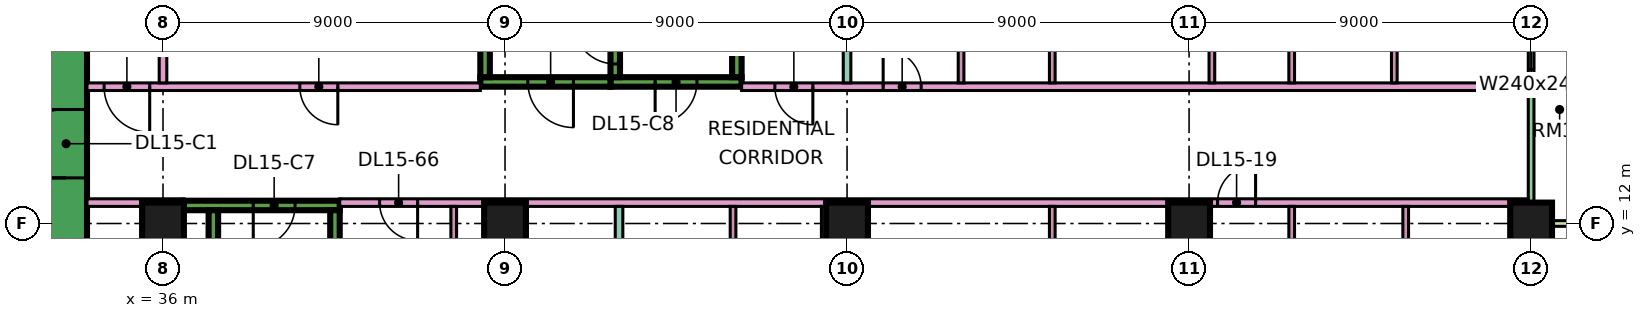
"""IFC4 building model, lengths in metres.
Left out: names, types, materials, properties, quantities, classifications, styles, units other than length and angle.
Written with IfcOpenShell. Run it as: python <this file> out.ifc"""

import sys

from ifc_helpers import new_model, si_unit, direction, frame, frame_2d, origin, origin_2d, place, context, subcontext, project, spatial, rectangle, extrude, element, fill, save


model = new_model("IFC4")
c1 = context("Model", 3, precision=1e-05, world=origin(), true_north=direction((0.0, 1.0)))
c2 = subcontext(c1, "Body", "Model", "MODEL_VIEW")
j1 = project(units=[si_unit("LENGTHUNIT", "METRE"), si_unit("PLANEANGLEUNIT", "RADIAN")], contexts=[c1])
p1 = place(None, origin())
s1 = spatial("IfcSite", under=j1, at=p1, CompositionType="ELEMENT")
p2 = place(p1, origin())
s2 = spatial("IfcBuilding", under=s1, at=p2, CompositionType="ELEMENT")
p3 = place(p2, frame((0.0, 0.0, 71.4)))
s3 = spatial("IfcBuildingStorey", under=s2, at=p3, CompositionType="ELEMENT", Elevation=71.4)
for number, where, z_axis, x_axis in (
    (1, (36.0, 12.0, 0.0), (0.0, 0.0, 1.0), (1.0, 0.0, 0.0)),
    (2, (45.0, 12.0, 0.0), (0.0, 0.0, 1.0), (1.0, 0.0, 0.0)),
    (3, (54.0, 12.0, 0.0), (0.0, 0.0, 1.0), (1.0, 0.0, 0.0)),
    (4, (63.0, 12.0, 0.0), (0.0, 0.0, 1.0), (1.0, 0.0, 0.0)),
    (5, (72.0, 12.0, 0.0), (0.0, 0.0, 1.0), (1.0, 0.0, 0.0)),
):
    element("IfcColumn", number, at=place(p3, frame(where, z_axis=z_axis, x_axis=x_axis)), inside=s3, PredefinedType="COLUMN", context=c2, shape_type="SweptSolid", body=[
        extrude(rectangle(XDim=1.1, YDim=1.1, at=origin_2d()), origin(), (0.0, 0.0, 1.0), 3.75),
    ])
p4 = place(p3, frame((33.45, 8.1, 0.0), z_axis=(0.0, 0.0, 1.0), x_axis=(0.0, 1.0, 0.0)))
e6 = element("IfcWall", 6, at=p4, inside=s3, PredefinedType="SHEAR", context=c2, shape_type="SweptSolid", body=[
    extrude(rectangle(XDim=10.8, YDim=1.1, at=frame_2d((5.4, 0.0))), origin(), (0.0, 0.0, 1.0), 3.75),
])
p5 = place(p4, frame((5.1, 0.0, 0.0)))
e7 = element("IfcOpeningElement", 7, at=p5, cuts=e6, PredefinedType="OPENING", context=c2, shape_type="SweptSolid", body=[
    extrude(rectangle(XDim=1.8, YDim=2.4, at=frame_2d((0.9, 1.2))), frame((0.0, 0.56, 0.0), z_axis=(0.0, -1.0, 0.0), x_axis=(1.0, 0.0, 0.0)), (0.0, 0.0, 1.0), 1.12),
])
p6 = place(p3, frame((36.55, 12.475, 0.0), z_axis=(0.0, 0.0, 1.0), x_axis=(1.0, 0.0, 0.0)))
e8 = element("IfcWall", 8, at=p6, inside=s3, PredefinedType="SHEAR", context=c2, shape_type="SweptSolid", body=[
    extrude(rectangle(XDim=4.1, YDim=0.25, at=frame_2d((2.05, 0.0))), origin(), (0.0, 0.0, 1.0), 3.75),
])
p7 = place(p6, frame((1.825, 0.0, 0.0)))
e9 = element("IfcOpeningElement", 9, at=p7, cuts=e8, PredefinedType="OPENING", context=c2, shape_type="SweptSolid", body=[
    extrude(rectangle(XDim=1.1, YDim=2.2, at=frame_2d((0.55, 1.1))), frame((0.0, 0.135, 0.0), z_axis=(0.0, -1.0, 0.0), x_axis=(1.0, 0.0, 0.0)), (0.0, 0.0, 1.0), 0.27),
])
for number, where, z_axis, x_axis in (
    (10, (37.325, 5.85, 0.0), (0.0, 0.0, 1.0), (0.0, 1.0, 0.0)),
    (11, (40.525, 5.85, 0.0), (0.0, 0.0, 1.0), (0.0, 1.0, 0.0)),
):
    element("IfcWall", number, at=place(p3, frame(where, z_axis=z_axis, x_axis=x_axis)), inside=s3, PredefinedType="SHEAR", context=c2, shape_type="SweptSolid", body=[
        extrude(rectangle(XDim=6.5, YDim=0.25, at=frame_2d((3.25, 0.0))), origin(), (0.0, 0.0, 1.0), 3.75),
    ])
p8 = place(p3, frame((47.775, 15.725, 0.0), z_axis=(0.0, 0.0, 1.0), x_axis=(1.0, 0.0, 0.0)))
e12 = element("IfcWall", 12, at=p8, inside=s3, PredefinedType="SHEAR", context=c2, shape_type="SweptSolid", body=[
    extrude(rectangle(XDim=3.45, YDim=0.25, at=frame_2d((1.725, 0.0))), origin(), (0.0, 0.0, 1.0), 3.75),
])
p9 = place(p8, frame((1.175, 0.0, 0.0)))
e13 = element("IfcOpeningElement", 13, at=p9, cuts=e12, PredefinedType="OPENING", context=c2, shape_type="SweptSolid", body=[
    extrude(rectangle(XDim=1.1, YDim=2.2, at=frame_2d((0.55, 1.1))), frame((0.0, 0.135, 0.0), z_axis=(0.0, -1.0, 0.0), x_axis=(1.0, 0.0, 0.0)), (0.0, 0.0, 1.0), 0.27),
])
p10 = place(p3, frame((47.9, 15.85, 0.0), z_axis=(0.0, 0.0, 1.0), x_axis=(0.0, 1.0, 0.0)))
e14 = element("IfcWall", 14, at=p10, inside=s3, PredefinedType="SHEAR", context=c2, shape_type="SweptSolid", body=[
    extrude(rectangle(XDim=6.5, YDim=0.25, at=frame_2d((3.25, 0.0))), origin(), (0.0, 0.0, 1.0), 3.75),
])
p11 = place(p10, frame((0.35, 0.0, 0.0)))
e15 = element("IfcOpeningElement", 15, at=p11, cuts=e14, PredefinedType="OPENING", context=c2, shape_type="SweptSolid", body=[
    extrude(rectangle(XDim=1.1, YDim=2.2, at=frame_2d((0.55, 1.1))), frame((0.0, 0.135, 0.0), z_axis=(0.0, -1.0, 0.0), x_axis=(1.0, 0.0, 0.0)), (0.0, 0.0, 1.0), 0.27),
])
p12 = place(p3, frame((51.1, 15.85, 0.0), z_axis=(0.0, 0.0, 1.0), x_axis=(0.0, 1.0, 0.0)))
e16 = element("IfcWall", 16, at=p12, inside=s3, PredefinedType="SHEAR", context=c2, shape_type="SweptSolid", body=[
    extrude(rectangle(XDim=6.5, YDim=0.25, at=frame_2d((3.25, 0.0))), origin(), (0.0, 0.0, 1.0), 3.75),
])
p13 = place(p3, frame((44.35, 15.725, 0.0), z_axis=(0.0, 0.0, 1.0), x_axis=(1.0, 0.0, 0.0)))
e17 = element("IfcWall", 17, at=p13, inside=s3, PredefinedType="SHEAR", context=c2, shape_type="SweptSolid", body=[
    extrude(rectangle(XDim=3.425, YDim=0.25, at=frame_2d((1.712, 0.0))), origin(), (0.0, 0.0, 1.0), 3.75),
])
p14 = place(p13, frame((1.25, 0.0, 0.0)))
e18 = element("IfcOpeningElement", 18, at=p14, cuts=e17, PredefinedType="OPENING", context=c2, shape_type="SweptSolid", body=[
    extrude(rectangle(XDim=1.2, YDim=2.2, at=frame_2d((0.6, 1.1))), frame((0.0, 0.135, 0.0), z_axis=(0.0, -1.0, 0.0), x_axis=(1.0, 0.0, 0.0)), (0.0, 0.0, 1.0), 0.27),
])
p15 = place(p3, frame((44.475, 15.85, 0.0), z_axis=(0.0, 0.0, 1.0), x_axis=(0.0, 1.0, 0.0)))
e19 = element("IfcWall", 19, at=p15, inside=s3, PredefinedType="SHEAR", context=c2, shape_type="SweptSolid", body=[
    extrude(rectangle(XDim=6.5, YDim=0.25, at=frame_2d((3.25, 0.0))), origin(), (0.0, 0.0, 1.0), 3.75),
])
p16 = place(p15, frame((1.75, 0.0, 0.0)))
e20 = element("IfcOpeningElement", 20, at=p16, cuts=e19, PredefinedType="OPENING", context=c2, shape_type="SweptSolid", body=[
    extrude(rectangle(XDim=1.1, YDim=2.2, at=frame_2d((0.55, 1.1))), frame((0.0, 0.135, 0.0), z_axis=(0.0, -1.0, 0.0), x_axis=(1.0, 0.0, 0.0)), (0.0, 0.0, 1.0), 0.27),
])
p17 = place(p15, frame((4.3, 0.0, 0.0)))
e21 = element("IfcOpeningElement", 21, at=p17, cuts=e19, PredefinedType="OPENING", context=c2, shape_type="SweptSolid", body=[
    extrude(rectangle(XDim=1.1, YDim=2.2, at=frame_2d((0.55, 1.1))), frame((0.0, 0.135, 0.0), z_axis=(0.0, -1.0, 0.0), x_axis=(1.0, 0.0, 0.0)), (0.0, 0.0, 1.0), 0.27),
])
p18 = place(p3, frame((72.0, 12.075, 0.0), z_axis=(0.0, 0.0, 1.0), x_axis=(0.0, 1.0, 0.0)))
e22 = element("IfcWall", 22, at=p18, inside=s3, PredefinedType="SOLIDWALL", context=c2, shape_type="SweptSolid", body=[
    extrude(rectangle(XDim=10.35, YDim=0.15, at=frame_2d((5.175, 0.0))), origin(), (0.0, 0.0, 1.0), 3.35),
])
p19 = place(p18, frame((3.975, 0.0, 0.45)))
e23 = element("IfcOpeningElement", 23, at=p19, cuts=e22, PredefinedType="OPENING", context=c2, shape_type="SweptSolid", body=[
    extrude(rectangle(XDim=2.4, YDim=2.4, at=frame_2d((1.2, 1.2))), frame((0.0, 0.085, 0.0), z_axis=(0.0, -1.0, 0.0), x_axis=(1.0, 0.0, 0.0)), (0.0, 0.0, 1.0), 0.17),
])
p20 = place(p18, frame((8.587, 0.0, 0.45)))
e24 = element("IfcOpeningElement", 24, at=p20, cuts=e22, PredefinedType="OPENING", context=c2, shape_type="SweptSolid", body=[
    extrude(rectangle(XDim=1.2, YDim=2.4, at=frame_2d((0.6, 1.2))), frame((0.0, 0.085, 0.0), z_axis=(0.0, -1.0, 0.0), x_axis=(1.0, 0.0, 0.0)), (0.0, 0.0, 1.0), 0.17),
])
p21 = place(p3, frame((73.5, 12.0, 0.0), z_axis=(0.0, 0.0, 1.0), x_axis=(-1.0, 0.0, 0.0)))
e25 = element("IfcWall", 25, at=p21, inside=s3, PredefinedType="SOLIDWALL", context=c2, shape_type="SweptSolid", body=[
    extrude(rectangle(XDim=1.5, YDim=0.15, at=frame_2d((0.75, 0.0))), origin(), (0.0, 0.0, 1.0), 3.35),
])
p22 = place(p3, frame((34.0, 12.55, 0.0), z_axis=(0.0, 0.0, 1.0), x_axis=(1.0, 0.0, 0.0)))
e26 = element("IfcWall", 26, at=p22, inside=s3, PredefinedType="PARTITIONING", context=c2, shape_type="SweptSolid", body=[
    extrude(rectangle(XDim=2.551, YDim=0.2, at=frame_2d((1.275, 0.0))), origin(), (0.0, 0.0, 1.0), 3.35),
])
p23 = place(p3, frame((34.0, 15.6, 0.0), z_axis=(0.0, 0.0, 1.0), x_axis=(1.0, 0.0, 0.0)))
e27 = element("IfcWall", 27, at=p23, inside=s3, PredefinedType="PARTITIONING", context=c2, shape_type="SweptSolid", body=[
    extrude(rectangle(XDim=10.35, YDim=0.2, at=frame_2d((5.175, 0.0))), origin(), (0.0, 0.0, 1.0), 3.35),
])
p24 = place(p23, frame((5.6, 0.0, 0.0)))
e28 = element("IfcOpeningElement", 28, at=p24, cuts=e27, PredefinedType="OPENING", context=c2, shape_type="SweptSolid", body=[
    extrude(rectangle(XDim=1.0, YDim=2.1, at=frame_2d((0.5, 1.05))), frame((0.0, 0.11, 0.0), z_axis=(0.0, -1.0, 0.0), x_axis=(1.0, 0.0, 0.0)), (0.0, 0.0, 1.0), 0.22),
])
p25 = place(p23, frame((0.45, 0.0, 0.0)))
e29 = element("IfcOpeningElement", 29, at=p25, cuts=e27, PredefinedType="OPENING", context=c2, shape_type="SweptSolid", body=[
    extrude(rectangle(XDim=1.2, YDim=2.1, at=frame_2d((0.6, 1.05))), frame((0.0, 0.11, 0.0), z_axis=(0.0, -1.0, 0.0), x_axis=(1.0, 0.0, 0.0)), (0.0, 0.0, 1.0), 0.22),
])
p26 = place(p3, frame((36.0, 15.7, 0.0), z_axis=(0.0, 0.0, 1.0), x_axis=(0.0, 1.0, 0.0)))
e30 = element("IfcWall", 30, at=p26, inside=s3, PredefinedType="PARTITIONING", context=c2, shape_type="SweptSolid", body=[
    extrude(rectangle(XDim=8.3, YDim=0.2, at=frame_2d((4.15, 0.0))), origin(), (0.0, 0.0, 1.0), 3.35),
])
p27 = place(p3, frame((40.65, 12.55, 0.0), z_axis=(0.0, 0.0, 1.0), x_axis=(1.0, 0.0, 0.0)))
e31 = element("IfcWall", 31, at=p27, inside=s3, PredefinedType="PARTITIONING", context=c2, shape_type="SweptSolid", body=[
    extrude(rectangle(XDim=31.276, YDim=0.2, at=frame_2d((15.638, 0.0))), origin(), (0.0, 0.0, 1.0), 3.35),
])
p28 = place(p27, frame((23.1, 0.0, 0.0)))
e32 = element("IfcOpeningElement", 32, at=p28, cuts=e31, PredefinedType="OPENING", context=c2, shape_type="SweptSolid", body=[
    extrude(rectangle(XDim=1.0, YDim=2.1, at=frame_2d((0.5, 1.05))), frame((0.0, 0.11, 0.0), z_axis=(0.0, -1.0, 0.0), x_axis=(1.0, 0.0, 0.0)), (0.0, 0.0, 1.0), 0.22),
])
p29 = place(p27, frame((1.05, 0.0, 0.0)))
e33 = element("IfcOpeningElement", 33, at=p29, cuts=e31, PredefinedType="OPENING", context=c2, shape_type="SweptSolid", body=[
    extrude(rectangle(XDim=1.0, YDim=2.1, at=frame_2d((0.5, 1.05))), frame((0.0, 0.11, 0.0), z_axis=(0.0, -1.0, 0.0), x_axis=(1.0, 0.0, 0.0)), (0.0, 0.0, 1.0), 0.22),
])
p30 = place(p3, frame((43.65, 5.825, 0.0), z_axis=(0.0, 0.0, 1.0), x_axis=(0.0, 1.0, 0.0)))
e34 = element("IfcWall", 34, at=p30, inside=s3, PredefinedType="PARTITIONING", context=c2, shape_type="SweptSolid", body=[
    extrude(rectangle(XDim=6.625, YDim=0.15, at=frame_2d((3.312, 0.0))), origin(), (0.0, 0.0, 1.0), 3.35),
])
p31 = place(p30, frame((4.425, 0.0, 0.0)))
e35 = element("IfcOpeningElement", 35, at=p31, cuts=e34, PredefinedType="OPENING", context=c2, shape_type="SweptSolid", body=[
    extrude(rectangle(XDim=0.9, YDim=2.1, at=frame_2d((0.45, 1.05))), frame((0.0, 0.085, 0.0), z_axis=(0.0, -1.0, 0.0), x_axis=(1.0, 0.0, 0.0)), (0.0, 0.0, 1.0), 0.17),
])
p32 = place(p3, frame((48.0, 5.875, 0.0), z_axis=(0.0, 0.0, 1.0), x_axis=(0.0, 1.0, 0.0)))
e36 = element("IfcWall", 36, at=p32, inside=s3, PredefinedType="PARTITIONING", context=c2, shape_type="SweptSolid", body=[
    extrude(rectangle(XDim=6.575, YDim=0.2, at=frame_2d((3.288, 0.0))), origin(), (0.0, 0.0, 1.0), 3.35),
])
p33 = place(p3, frame((51.0, 7.225, 0.0), z_axis=(0.0, 0.0, 1.0), x_axis=(0.0, 1.0, 0.0)))
e37 = element("IfcWall", 37, at=p33, inside=s3, PredefinedType="PARTITIONING", context=c2, shape_type="SweptSolid", body=[
    extrude(rectangle(XDim=5.225, YDim=0.15, at=frame_2d((2.612, 0.0))), origin(), (0.0, 0.0, 1.0), 3.35),
])
p34 = place(p3, frame((51.225, 15.6, 0.0), z_axis=(0.0, 0.0, 1.0), x_axis=(1.0, 0.0, 0.0)))
e38 = element("IfcWall", 38, at=p34, inside=s3, PredefinedType="PARTITIONING", context=c2, shape_type="SweptSolid", body=[
    extrude(rectangle(XDim=20.701, YDim=0.2, at=frame_2d((10.351, 0.0))), origin(), (0.0, 0.0, 1.0), 3.35),
])
p35 = place(p34, frame((3.725, 0.0, 0.0)))
e39 = element("IfcOpeningElement", 39, at=p35, cuts=e38, PredefinedType="OPENING", context=c2, shape_type="SweptSolid", body=[
    extrude(rectangle(XDim=1.0, YDim=2.1, at=frame_2d((0.5, 1.05))), frame((0.0, 0.11, 0.0), z_axis=(0.0, -1.0, 0.0), x_axis=(1.0, 0.0, 0.0)), (0.0, 0.0, 1.0), 0.22),
])
p36 = place(p34, frame((0.875, 0.0, 0.0)))
e40 = element("IfcOpeningElement", 40, at=p36, cuts=e38, PredefinedType="OPENING", context=c2, shape_type="SweptSolid", body=[
    extrude(rectangle(XDim=1.0, YDim=2.1, at=frame_2d((0.5, 1.05))), frame((0.0, 0.11, 0.0), z_axis=(0.0, -1.0, 0.0), x_axis=(1.0, 0.0, 0.0)), (0.0, 0.0, 1.0), 0.22),
])
p37 = place(p3, frame((53.4, 7.225, 0.0), z_axis=(0.0, 0.0, 1.0), x_axis=(0.0, 1.0, 0.0)))
e41 = element("IfcWall", 41, at=p37, inside=s3, PredefinedType="PARTITIONING", context=c2, shape_type="SweptSolid", body=[
    extrude(rectangle(XDim=5.225, YDim=0.15, at=frame_2d((2.612, 0.0))), origin(), (0.0, 0.0, 1.0), 3.35),
])
p38 = place(p3, frame((54.0, 15.7, 0.0), z_axis=(0.0, 0.0, 1.0), x_axis=(0.0, 1.0, 0.0)))
e42 = element("IfcWall", 42, at=p38, inside=s3, PredefinedType="PARTITIONING", context=c2, shape_type="SweptSolid", body=[
    extrude(rectangle(XDim=8.3, YDim=0.2, at=frame_2d((4.15, 0.0))), origin(), (0.0, 0.0, 1.0), 3.35),
])
p39 = place(p3, frame((57.0, 15.7, 0.0), z_axis=(0.0, 0.0, 1.0), x_axis=(0.0, 1.0, 0.0)))
e43 = element("IfcWall", 43, at=p39, inside=s3, PredefinedType="PARTITIONING", context=c2, shape_type="SweptSolid", body=[
    extrude(rectangle(XDim=3.125, YDim=0.15, at=frame_2d((1.562, 0.0))), origin(), (0.0, 0.0, 1.0), 3.35),
])
p40 = place(p3, frame((59.4, 7.225, 0.0), z_axis=(0.0, 0.0, 1.0), x_axis=(0.0, 1.0, 0.0)))
e44 = element("IfcWall", 44, at=p40, inside=s3, PredefinedType="PARTITIONING", context=c2, shape_type="SweptSolid", body=[
    extrude(rectangle(XDim=5.225, YDim=0.15, at=frame_2d((2.612, 0.0))), origin(), (0.0, 0.0, 1.0), 3.35),
])
p41 = place(p3, frame((59.4, 15.7, 0.0), z_axis=(0.0, 0.0, 1.0), x_axis=(0.0, 1.0, 0.0)))
e45 = element("IfcWall", 45, at=p41, inside=s3, PredefinedType="PARTITIONING", context=c2, shape_type="SweptSolid", body=[
    extrude(rectangle(XDim=3.125, YDim=0.15, at=frame_2d((1.562, 0.0))), origin(), (0.0, 0.0, 1.0), 3.35),
])
p42 = place(p3, frame((62.7, 7.225, 0.0), z_axis=(0.0, 0.0, 1.0), x_axis=(0.0, 1.0, 0.0)))
e46 = element("IfcWall", 46, at=p42, inside=s3, PredefinedType="PARTITIONING", context=c2, shape_type="SweptSolid", body=[
    extrude(rectangle(XDim=5.225, YDim=0.15, at=frame_2d((2.612, 0.0))), origin(), (0.0, 0.0, 1.0), 3.35),
])
p43 = place(p42, frame((2.275, 0.0, 0.0)))
e47 = element("IfcOpeningElement", 47, at=p43, cuts=e46, PredefinedType="OPENING", context=c2, shape_type="SweptSolid", body=[
    extrude(rectangle(XDim=0.8, YDim=2.1, at=frame_2d((0.4, 1.05))), frame((0.0, 0.085, 0.0), z_axis=(0.0, -1.0, 0.0), x_axis=(1.0, 0.0, 0.0)), (0.0, 0.0, 1.0), 0.17),
])
p44 = place(p3, frame((63.6, 15.7, 0.0), z_axis=(0.0, 0.0, 1.0), x_axis=(0.0, 1.0, 0.0)))
e48 = element("IfcWall", 48, at=p44, inside=s3, PredefinedType="PARTITIONING", context=c2, shape_type="SweptSolid", body=[
    extrude(rectangle(XDim=3.125, YDim=0.15, at=frame_2d((1.562, 0.0))), origin(), (0.0, 0.0, 1.0), 3.35),
])
p45 = place(p3, frame((65.7, 7.225, 0.0), z_axis=(0.0, 0.0, 1.0), x_axis=(0.0, 1.0, 0.0)))
e49 = element("IfcWall", 49, at=p45, inside=s3, PredefinedType="PARTITIONING", context=c2, shape_type="SweptSolid", body=[
    extrude(rectangle(XDim=5.225, YDim=0.15, at=frame_2d((2.612, 0.0))), origin(), (0.0, 0.0, 1.0), 3.35),
])
for number, where, z_axis, x_axis in (
    (50, (65.7, 15.7, 0.0), (0.0, 0.0, 1.0), (0.0, 1.0, 0.0)),
    (51, (68.4, 15.7, 0.0), (0.0, 0.0, 1.0), (0.0, 1.0, 0.0)),
):
    element("IfcWall", number, at=place(p3, frame(where, z_axis=z_axis, x_axis=x_axis)), inside=s3, PredefinedType="PARTITIONING", context=c2, shape_type="SweptSolid", body=[
        extrude(rectangle(XDim=3.125, YDim=0.15, at=frame_2d((1.562, 0.0))), origin(), (0.0, 0.0, 1.0), 3.35),
    ])
p46 = place(p3, frame((68.7, 7.225, 0.0), z_axis=(0.0, 0.0, 1.0), x_axis=(0.0, 1.0, 0.0)))
e52 = element("IfcWall", 52, at=p46, inside=s3, PredefinedType="PARTITIONING", context=c2, shape_type="SweptSolid", body=[
    extrude(rectangle(XDim=5.225, YDim=0.15, at=frame_2d((2.612, 0.0))), origin(), (0.0, 0.0, 1.0), 3.35),
])
p47 = place(p19, origin())
e53 = element("IfcWindow", 53, at=p47, inside=s3, PartitioningType="SINGLE_PANEL", PredefinedType="WINDOW", context=c2, shape_type="SweptSolid", body=[
    extrude(rectangle(XDim=2.4, YDim=2.4, at=frame_2d((1.2, 1.2))), frame((0.0, 0.03, 0.0), z_axis=(0.0, -1.0, 0.0), x_axis=(1.0, 0.0, 0.0)), (0.0, 0.0, 1.0), 0.06),
])
fill(e23, e53)
p48 = place(p5, origin())
e54 = element("IfcDoor", 54, at=p48, inside=s3, OperationType="DOUBLE_DOOR_SINGLE_SWING", PredefinedType="DOOR", context=c2, shape_type="SweptSolid", body=[
    extrude(rectangle(XDim=1.8, YDim=2.4, at=frame_2d((0.9, 1.2))), frame((0.0, 0.025, 0.0), z_axis=(0.0, -1.0, 0.0), x_axis=(1.0, 0.0, 0.0)), (0.0, 0.0, 1.0), 0.05),
])
fill(e7, e54)
p49 = place(p7, frame((1.1, 0.0, 0.0), z_axis=(0.0, 0.0, 1.0), x_axis=(-1.0, 0.0, 0.0)))
e55 = element("IfcDoor", 55, at=p49, inside=s3, OperationType="SINGLE_SWING_LEFT", PredefinedType="DOOR", context=c2, shape_type="SweptSolid", body=[
    extrude(rectangle(XDim=1.1, YDim=2.2, at=frame_2d((0.55, 1.1))), frame((0.0, 0.025, 0.0), z_axis=(0.0, -1.0, 0.0), x_axis=(1.0, 0.0, 0.0)), (0.0, 0.0, 1.0), 0.05),
])
fill(e9, e55)
p50 = place(p9, frame((1.1, 0.0, 0.0), z_axis=(0.0, 0.0, 1.0), x_axis=(-1.0, 0.0, 0.0)))
e56 = element("IfcDoor", 56, at=p50, inside=s3, OperationType="SINGLE_SWING_LEFT", PredefinedType="DOOR", context=c2, shape_type="SweptSolid", body=[
    extrude(rectangle(XDim=1.1, YDim=2.2, at=frame_2d((0.55, 1.1))), frame((0.0, 0.025, 0.0), z_axis=(0.0, -1.0, 0.0), x_axis=(1.0, 0.0, 0.0)), (0.0, 0.0, 1.0), 0.05),
])
fill(e13, e56)
p51 = place(p14, origin())
e57 = element("IfcDoor", 57, at=p51, inside=s3, OperationType="SINGLE_SWING_RIGHT", PredefinedType="DOOR", context=c2, shape_type="SweptSolid", body=[
    extrude(rectangle(XDim=1.2, YDim=2.2, at=frame_2d((0.6, 1.1))), frame((0.0, 0.025, 0.0), z_axis=(0.0, -1.0, 0.0), x_axis=(1.0, 0.0, 0.0)), (0.0, 0.0, 1.0), 0.05),
])
fill(e18, e57)
p52 = place(p11, frame((1.1, 0.0, 0.0), z_axis=(0.0, 0.0, 1.0), x_axis=(-1.0, 0.0, 0.0)))
e58 = element("IfcDoor", 58, at=p52, inside=s3, OperationType="SINGLE_SWING_RIGHT", PredefinedType="DOOR", context=c2, shape_type="SweptSolid", body=[
    extrude(rectangle(XDim=1.1, YDim=2.2, at=frame_2d((0.55, 1.1))), frame((0.0, 0.025, 0.0), z_axis=(0.0, -1.0, 0.0), x_axis=(1.0, 0.0, 0.0)), (0.0, 0.0, 1.0), 0.05),
])
fill(e15, e58)
p53 = place(p24, origin())
e59 = element("IfcDoor", 59, at=p53, inside=s3, OperationType="SINGLE_SWING_RIGHT", PredefinedType="DOOR", context=c2, shape_type="SweptSolid", body=[
    extrude(rectangle(XDim=1.0, YDim=2.1, at=frame_2d((0.5, 1.05))), frame((0.0, 0.025, 0.0), z_axis=(0.0, -1.0, 0.0), x_axis=(1.0, 0.0, 0.0)), (0.0, 0.0, 1.0), 0.05),
])
fill(e28, e59)
p54 = place(p35, origin())
e60 = element("IfcDoor", 60, at=p54, inside=s3, OperationType="SINGLE_SWING_LEFT", PredefinedType="DOOR", context=c2, shape_type="SweptSolid", body=[
    extrude(rectangle(XDim=1.0, YDim=2.1, at=frame_2d((0.5, 1.05))), frame((0.0, 0.025, 0.0), z_axis=(0.0, -1.0, 0.0), x_axis=(1.0, 0.0, 0.0)), (0.0, 0.0, 1.0), 0.05),
])
fill(e39, e60)
p55 = place(p28, frame((1.0, 0.0, 0.0), z_axis=(0.0, 0.0, 1.0), x_axis=(-1.0, 0.0, 0.0)))
e61 = element("IfcDoor", 61, at=p55, inside=s3, OperationType="SINGLE_SWING_RIGHT", PredefinedType="DOOR", context=c2, shape_type="SweptSolid", body=[
    extrude(rectangle(XDim=1.0, YDim=2.1, at=frame_2d((0.5, 1.05))), frame((0.0, 0.025, 0.0), z_axis=(0.0, -1.0, 0.0), x_axis=(1.0, 0.0, 0.0)), (0.0, 0.0, 1.0), 0.05),
])
fill(e32, e61)
p56 = place(p25, origin())
e62 = element("IfcDoor", 62, at=p56, inside=s3, OperationType="SINGLE_SWING_RIGHT", PredefinedType="DOOR", context=c2, shape_type="SweptSolid", body=[
    extrude(rectangle(XDim=1.2, YDim=2.1, at=frame_2d((0.6, 1.05))), frame((0.0, 0.025, 0.0), z_axis=(0.0, -1.0, 0.0), x_axis=(1.0, 0.0, 0.0)), (0.0, 0.0, 1.0), 0.05),
])
fill(e29, e62)
p57 = place(p36, origin())
e63 = element("IfcDoor", 63, at=p57, inside=s3, OperationType="SINGLE_SWING_RIGHT", PredefinedType="DOOR", context=c2, shape_type="SweptSolid", body=[
    extrude(rectangle(XDim=1.0, YDim=2.1, at=frame_2d((0.5, 1.05))), frame((0.0, 0.025, 0.0), z_axis=(0.0, -1.0, 0.0), x_axis=(1.0, 0.0, 0.0)), (0.0, 0.0, 1.0), 0.05),
])
fill(e40, e63)
p58 = place(p29, origin())
e64 = element("IfcDoor", 64, at=p58, inside=s3, OperationType="SINGLE_SWING_RIGHT", PredefinedType="DOOR", context=c2, shape_type="SweptSolid", body=[
    extrude(rectangle(XDim=1.0, YDim=2.1, at=frame_2d((0.5, 1.05))), frame((0.0, 0.025, 0.0), z_axis=(0.0, -1.0, 0.0), x_axis=(1.0, 0.0, 0.0)), (0.0, 0.0, 1.0), 0.05),
])
fill(e33, e64)
save(model, sys.argv[1])
